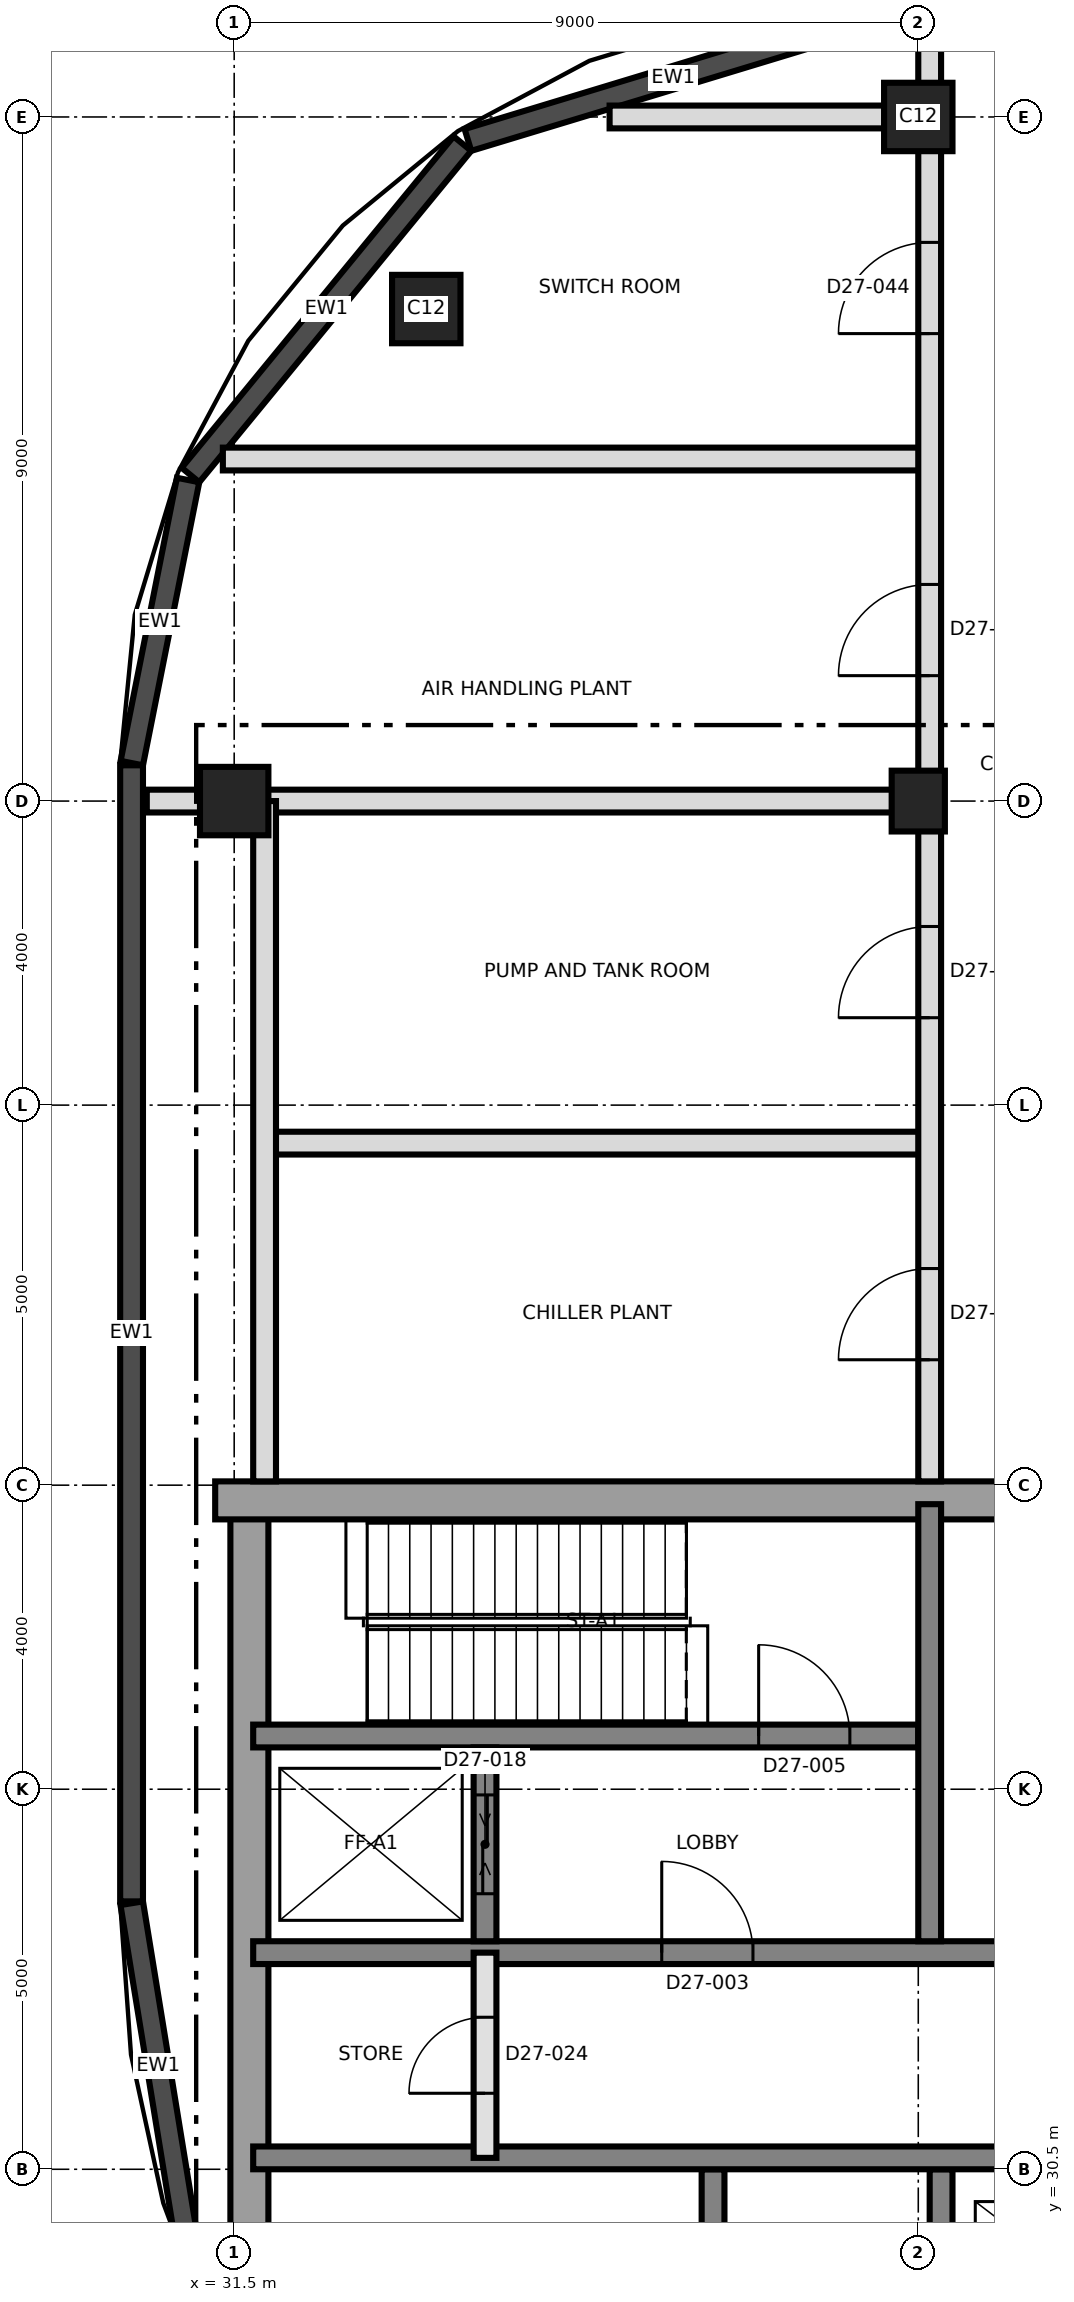
"""IFC4 building model, lengths in metres.
Left out: names, types, materials, properties, quantities, classifications, styles, units other than length and angle.
Written with IfcOpenShell. Run it as: python <this file> out.ifc"""

import sys

from ifc_helpers import new_model, si_unit, direction, frame, frame_2d, origin, origin_2d, place, context, subcontext, project, spatial, rectangle, extrude, element, fill, save


model = new_model("IFC4")
c1 = context("Model", 3, precision=1e-05, world=origin(), true_north=direction((0.0, 1.0)))
c2 = subcontext(c1, "Body", "Model", "MODEL_VIEW")
j1 = project(units=[si_unit("LENGTHUNIT", "METRE"), si_unit("PLANEANGLEUNIT", "RADIAN")], contexts=[c1])
p1 = place(None, origin())
s1 = spatial("IfcSite", under=j1, at=p1, CompositionType="ELEMENT")
p2 = place(p1, origin())
s2 = spatial("IfcBuilding", under=s1, at=p2, CompositionType="ELEMENT")
p3 = place(p2, frame((0.0, 0.0, 243.9)))
s3 = spatial("IfcBuildingStorey", under=s2, at=p3, CompositionType="ELEMENT", Elevation=243.9)
p4 = place(p3, frame((31.7, 21.75, 0.0), z_axis=(0.0, 0.0, 1.0), x_axis=(0.0, 1.0, 0.0)))
e1 = element("IfcWall", 1, at=p4, inside=s3, PredefinedType="SHEAR", context=c2, shape_type="SweptSolid", body=[
    extrude(rectangle(XDim=17.5, YDim=0.5, at=frame_2d((8.75, 0.0))), origin(), (0.0, 0.0, 1.0), 5.5),
])
p5 = place(p3, frame((31.25, 39.3, 0.0), z_axis=(0.0, 0.0, 1.0), x_axis=(1.0, 0.0, 0.0)))
e2 = element("IfcWall", 2, at=p5, inside=s3, PredefinedType="SHEAR", context=c2, shape_type="SweptSolid", body=[
    extrude(rectangle(XDim=27.0, YDim=0.5, at=frame_2d((13.5, 0.0))), origin(), (0.0, 0.0, 1.0), 5.5),
])
p6 = place(p5, frame((10.45, 0.0, 0.0)))
e3 = element("IfcOpeningElement", 3, at=p6, cuts=e2, PredefinedType="OPENING", context=c2, shape_type="SweptSolid", body=[
    extrude(rectangle(XDim=1.2, YDim=2.1, at=frame_2d((0.6, 1.05))), frame((0.0, 0.26, 0.0), z_axis=(0.0, -1.0, 0.0), x_axis=(1.0, 0.0, 0.0)), (0.0, 0.0, 1.0), 0.52),
])
p7 = place(p3, frame((37.8, 21.75, 0.0), z_axis=(0.0, 0.0, 1.0), x_axis=(0.0, 1.0, 0.0)))
e4 = element("IfcWall", 4, at=p7, inside=s3, PredefinedType="SHEAR", context=c2, shape_type="SweptSolid", body=[
    extrude(rectangle(XDim=8.75, YDim=0.3, at=frame_2d((4.375, 0.0))), origin(), (0.0, 0.0, 1.0), 5.5),
])
p8 = place(p7, frame((5.525, 0.0, 0.0)))
e5 = element("IfcOpeningElement", 5, at=p8, cuts=e4, PredefinedType="OPENING", context=c2, shape_type="SweptSolid", body=[
    extrude(rectangle(XDim=1.0, YDim=2.1, at=frame_2d((0.5, 1.05))), frame((0.0, 0.16, 0.0), z_axis=(0.0, -1.0, 0.0), x_axis=(1.0, 0.0, 0.0)), (0.0, 0.0, 1.0), 0.32),
])
p9 = place(p3, frame((40.8, 21.75, 0.0), z_axis=(0.0, 0.0, 1.0), x_axis=(0.0, 1.0, 0.0)))
e6 = element("IfcWall", 6, at=p9, inside=s3, PredefinedType="SHEAR", context=c2, shape_type="SweptSolid", body=[
    extrude(rectangle(XDim=8.75, YDim=0.3, at=frame_2d((4.375, 0.0))), origin(), (0.0, 0.0, 1.0), 5.5),
])
p10 = place(p9, frame((3.9, 0.0, 0.0)))
e7 = element("IfcOpeningElement", 7, at=p10, cuts=e6, PredefinedType="OPENING", context=c2, shape_type="SweptSolid", body=[
    extrude(rectangle(XDim=1.5, YDim=2.1, at=frame_2d((0.75, 1.05))), frame((0.0, 0.16, 0.0), z_axis=(0.0, -1.0, 0.0), x_axis=(1.0, 0.0, 0.0)), (0.0, 0.0, 1.0), 0.32),
])
p11 = place(p3, frame((31.75, 30.65, 0.0), z_axis=(0.0, 0.0, 1.0), x_axis=(1.0, 0.0, 0.0)))
e8 = element("IfcWall", 8, at=p11, inside=s3, PredefinedType="SHEAR", context=c2, shape_type="SweptSolid", body=[
    extrude(rectangle(XDim=26.5, YDim=0.3, at=frame_2d((13.25, 0.0))), origin(), (0.0, 0.0, 1.0), 5.5),
])
p12 = place(p11, frame((24.75, 0.0, 0.0)))
e9 = element("IfcOpeningElement", 9, at=p12, cuts=e8, PredefinedType="OPENING", context=c2, shape_type="SweptSolid", body=[
    extrude(rectangle(XDim=1.0, YDim=2.1, at=frame_2d((0.5, 1.05))), frame((0.0, 0.16, 0.0), z_axis=(0.0, -1.0, 0.0), x_axis=(1.0, 0.0, 0.0)), (0.0, 0.0, 1.0), 0.32),
])
p13 = place(p3, frame((31.75, 33.35, 0.0), z_axis=(0.0, 0.0, 1.0), x_axis=(1.0, 0.0, 0.0)))
e10 = element("IfcWall", 10, at=p13, inside=s3, PredefinedType="SHEAR", context=c2, shape_type="SweptSolid", body=[
    extrude(rectangle(XDim=26.5, YDim=0.3, at=frame_2d((13.25, 0.0))), origin(), (0.0, 0.0, 1.0), 5.5),
])
p14 = place(p13, frame((13.9, 0.0, 0.0)))
e11 = element("IfcOpeningElement", 11, at=p14, cuts=e10, PredefinedType="OPENING", context=c2, shape_type="SweptSolid", body=[
    extrude(rectangle(XDim=1.4, YDim=2.1, at=frame_2d((0.7, 1.05))), frame((0.0, 0.16, 0.0), z_axis=(0.0, -1.0, 0.0), x_axis=(1.0, 0.0, 0.0)), (0.0, 0.0, 1.0), 0.32),
])
p15 = place(p13, frame((5.375, 0.0, 0.0)))
e12 = element("IfcOpeningElement", 12, at=p15, cuts=e10, PredefinedType="OPENING", context=c2, shape_type="SweptSolid", body=[
    extrude(rectangle(XDim=1.2, YDim=2.1, at=frame_2d((0.6, 1.05))), frame((0.0, 0.16, 0.0), z_axis=(0.0, -1.0, 0.0), x_axis=(1.0, 0.0, 0.0)), (0.0, 0.0, 1.0), 0.32),
])
p16 = place(p13, frame((19.925, 0.0, 0.0)))
e13 = element("IfcOpeningElement", 13, at=p16, cuts=e10, PredefinedType="OPENING", context=c2, shape_type="SweptSolid", body=[
    extrude(rectangle(XDim=1.2, YDim=2.1, at=frame_2d((0.6, 1.05))), frame((0.0, 0.16, 0.0), z_axis=(0.0, -1.0, 0.0), x_axis=(1.0, 0.0, 0.0)), (0.0, 0.0, 1.0), 0.32),
])
p17 = place(p3, frame((31.75, 36.2, 0.0), z_axis=(0.0, 0.0, 1.0), x_axis=(1.0, 0.0, 0.0)))
e14 = element("IfcWall", 14, at=p17, inside=s3, PredefinedType="SHEAR", context=c2, shape_type="SweptSolid", body=[
    extrude(rectangle(XDim=8.75, YDim=0.3, at=frame_2d((4.375, 0.0))), origin(), (0.0, 0.0, 1.0), 5.5),
])
p18 = place(p17, frame((6.65, 0.0, 0.0)))
e15 = element("IfcOpeningElement", 15, at=p18, cuts=e14, PredefinedType="OPENING", context=c2, shape_type="SweptSolid", body=[
    extrude(rectangle(XDim=1.2, YDim=2.1, at=frame_2d((0.6, 1.05))), frame((0.0, 0.16, 0.0), z_axis=(0.0, -1.0, 0.0), x_axis=(1.0, 0.0, 0.0)), (0.0, 0.0, 1.0), 0.32),
])
p19 = place(p3, frame((40.65, 33.5, 0.0), z_axis=(0.0, 0.0, 1.0), x_axis=(0.0, 1.0, 0.0)))
e16 = element("IfcWall", 16, at=p19, inside=s3, PredefinedType="SHEAR", context=c2, shape_type="SweptSolid", body=[
    extrude(rectangle(XDim=5.75, YDim=0.3, at=frame_2d((2.875, 0.0))), origin(), (0.0, 0.0, 1.0), 5.5),
])
p20 = place(p3, frame((34.8, 33.5, 0.0), z_axis=(0.0, 0.0, 1.0), x_axis=(0.0, 1.0, 0.0)))
e17 = element("IfcWall", 17, at=p20, inside=s3, PredefinedType="SHEAR", context=c2, shape_type="SweptSolid", body=[
    extrude(rectangle(XDim=2.55, YDim=0.3, at=frame_2d((1.275, 0.0))), origin(), (0.0, 0.0, 1.0), 5.5),
])
p21 = place(p20, frame((0.625, 0.0, 0.0)))
e18 = element("IfcOpeningElement", 18, at=p21, cuts=e17, PredefinedType="OPENING", context=c2, shape_type="SweptSolid", body=[
    extrude(rectangle(XDim=1.3, YDim=2.4, at=frame_2d((0.65, 1.2))), frame((0.0, 0.16, 0.0), z_axis=(0.0, -1.0, 0.0), x_axis=(1.0, 0.0, 0.0)), (0.0, 0.0, 1.0), 0.32),
])
p22 = place(p3, frame((31.5, 48.5, 0.0), z_axis=(0.0, 0.0, 1.0), x_axis=(1.0, 0.0, 0.0)))
e19 = element("IfcColumn", 19, at=p22, inside=s3, PredefinedType="COLUMN", context=c2, shape_type="SweptSolid", body=[
    extrude(rectangle(XDim=0.9, YDim=0.9, at=origin_2d()), origin(), (0.0, 0.0, 1.0), 5.5),
])
p23 = place(p3, frame((40.5, 48.5, 0.0), z_axis=(0.0, 0.0, 1.0), x_axis=(0.0, 1.0, 0.0)))
e20 = element("IfcColumn", 20, at=p23, inside=s3, PredefinedType="COLUMN", context=c2, shape_type="SweptSolid", body=[
    extrude(rectangle(XDim=0.8, YDim=0.7, at=origin_2d()), origin(), (0.0, 0.0, 1.0), 5.5),
])
for number, where, z_axis, x_axis in (
    (21, (34.027, 54.973, 0.0), (0.0, 0.0, 1.0), (1.0, 0.0, 0.0)),
    (22, (40.5, 57.5, 0.0), (0.0, 0.0, 1.0), (1.0, 0.0, 0.0)),
):
    element("IfcColumn", number, at=place(p3, frame(where, z_axis=z_axis, x_axis=x_axis)), inside=s3, PredefinedType="COLUMN", context=c2, shape_type="SweptSolid", body=[
        extrude(rectangle(XDim=0.9, YDim=0.9, at=origin_2d()), origin(), (0.0, 0.0, 1.0), 5.5),
    ])
p24 = place(p3, frame((44.723, 58.103, 0.0), z_axis=(0.0, 0.0, 1.0), x_axis=(-0.98779137081, 0.155782565629, 0.0)))
e23 = element("IfcWall", 23, at=p24, inside=s3, PredefinedType="SOLIDWALL", context=c2, shape_type="SweptSolid", body=[
    extrude(rectangle(XDim=4.736, YDim=0.3, at=frame_2d((2.368, 0.0))), origin(), (0.0, 0.0, 1.0), 5.2),
])
p25 = place(p3, frame((39.978, 58.836, 0.0), z_axis=(0.0, 0.0, 1.0), x_axis=(-0.956941081769, -0.29028221789, 0.0)))
e24 = element("IfcWall", 24, at=p25, inside=s3, PredefinedType="SOLIDWALL", context=c2, shape_type="SweptSolid", body=[
    extrude(rectangle(XDim=5.646, YDim=0.3, at=frame_2d((2.823, 0.0))), origin(), (0.0, 0.0, 1.0), 5.2),
])
p26 = place(p3, frame((34.502, 57.149, 0.0), z_axis=(0.0, 0.0, 1.0), x_axis=(-0.63439223677, -0.773011312936, 0.0)))
e25 = element("IfcWall", 25, at=p26, inside=s3, PredefinedType="SOLIDWALL", context=c2, shape_type="SweptSolid", body=[
    extrude(rectangle(XDim=5.639, YDim=0.3, at=frame_2d((2.82, 0.0))), origin(), (0.0, 0.0, 1.0), 5.2),
])
p27 = place(p3, frame((30.894, 52.724, 0.0), z_axis=(0.0, 0.0, 1.0), x_axis=(-0.195077379777, -0.980787854686, 0.0)))
e26 = element("IfcWall", 26, at=p27, inside=s3, PredefinedType="SOLIDWALL", context=c2, shape_type="SweptSolid", body=[
    extrude(rectangle(XDim=3.797, YDim=0.3, at=frame_2d((1.898, 0.0))), origin(), (0.0, 0.0, 1.0), 5.2),
])
p28 = place(p3, frame((30.15, 48.97, 0.0), z_axis=(0.0, 0.0, 1.0), x_axis=(0.0, -1.0, 0.0)))
e27 = element("IfcWall", 27, at=p28, inside=s3, PredefinedType="SOLIDWALL", context=c2, shape_type="SweptSolid", body=[
    extrude(rectangle(XDim=14.946, YDim=0.3, at=frame_2d((7.473, 0.0))), origin(), (0.0, 0.0, 1.0), 5.2),
])
p29 = place(p3, frame((30.152, 34.0, 0.0), z_axis=(0.0, 0.0, 1.0), x_axis=(0.160697303067, -0.987003736967, 0.0)))
e28 = element("IfcWall", 28, at=p29, inside=s3, PredefinedType="SOLIDWALL", context=c2, shape_type="SweptSolid", body=[
    extrude(rectangle(XDim=4.333, YDim=0.3, at=frame_2d((2.167, 0.0))), origin(), (0.0, 0.0, 1.0), 5.2),
])
p30 = place(p3, frame((34.8, 30.65, 0.0), z_axis=(0.0, 0.0, 1.0), x_axis=(0.0, 1.0, 0.0)))
e29 = element("IfcWall", 29, at=p30, inside=s3, PredefinedType="SOLIDWALL", context=c2, shape_type="SweptSolid", body=[
    extrude(rectangle(XDim=2.7, YDim=0.3, at=frame_2d((1.35, 0.0))), origin(), (0.0, 0.0, 1.0), 5.2),
])
p31 = place(p30, frame((0.85, 0.0, 0.0)))
e30 = element("IfcOpeningElement", 30, at=p31, cuts=e29, PredefinedType="OPENING", context=c2, shape_type="SweptSolid", body=[
    extrude(rectangle(XDim=1.0, YDim=2.1, at=frame_2d((0.5, 1.05))), frame((0.0, 0.16, 0.0), z_axis=(0.0, -1.0, 0.0), x_axis=(1.0, 0.0, 0.0)), (0.0, 0.0, 1.0), 0.32),
])
p32 = place(p3, frame((31.9, 44.0, 0.0), z_axis=(0.0, 0.0, 1.0), x_axis=(1.0, 0.0, 0.0)))
e31 = element("IfcWall", 31, at=p32, inside=s3, PredefinedType="PARTITIONING", context=c2, shape_type="SweptSolid", body=[
    extrude(rectangle(XDim=8.75, YDim=0.3, at=frame_2d((4.375, 0.0))), origin(), (0.0, 0.0, 1.0), 5.2),
])
p33 = place(p3, frame((30.35, 48.5, 0.0), z_axis=(0.0, 0.0, 1.0), x_axis=(1.0, 0.0, 0.0)))
e32 = element("IfcWall", 32, at=p33, inside=s3, PredefinedType="PARTITIONING", context=c2, shape_type="SweptSolid", body=[
    extrude(rectangle(XDim=10.3, YDim=0.3, at=frame_2d((5.15, 0.0))), origin(), (0.0, 0.0, 1.0), 5.2),
])
p34 = place(p3, frame((31.351, 53.0, 0.0), z_axis=(0.0, 0.0, 1.0), x_axis=(1.0, 0.0, 0.0)))
e33 = element("IfcWall", 33, at=p34, inside=s3, PredefinedType="PARTITIONING", context=c2, shape_type="SweptSolid", body=[
    extrude(rectangle(XDim=9.299, YDim=0.3, at=frame_2d((4.649, 0.0))), origin(), (0.0, 0.0, 1.0), 5.2),
])
p35 = place(p3, frame((36.439, 57.5, 0.0), z_axis=(0.0, 0.0, 1.0), x_axis=(1.0, 0.0, 0.0)))
e34 = element("IfcWall", 34, at=p35, inside=s3, PredefinedType="PARTITIONING", context=c2, shape_type="SweptSolid", body=[
    extrude(rectangle(XDim=4.211, YDim=0.3, at=frame_2d((2.105, 0.0))), origin(), (0.0, 0.0, 1.0), 5.2),
])
p36 = place(p3, frame((31.9, 39.55, 0.0), z_axis=(0.0, 0.0, 1.0), x_axis=(0.0, 1.0, 0.0)))
e35 = element("IfcWall", 35, at=p36, inside=s3, PredefinedType="PARTITIONING", context=c2, shape_type="SweptSolid", body=[
    extrude(rectangle(XDim=8.95, YDim=0.3, at=frame_2d((4.475, 0.0))), origin(), (0.0, 0.0, 1.0), 5.2),
])
p37 = place(p3, frame((40.65, 39.55, 0.0), z_axis=(0.0, 0.0, 1.0), x_axis=(0.0, 1.0, 0.0)))
e36 = element("IfcWall", 36, at=p37, inside=s3, PredefinedType="PARTITIONING", context=c2, shape_type="SweptSolid", body=[
    extrude(rectangle(XDim=19.0, YDim=0.3, at=frame_2d((9.5, 0.0))), origin(), (0.0, 0.0, 1.0), 5.2),
])
p38 = place(p37, frame((1.6, 0.0, 0.0)))
e37 = element("IfcOpeningElement", 37, at=p38, cuts=e36, PredefinedType="OPENING", context=c2, shape_type="SweptSolid", body=[
    extrude(rectangle(XDim=1.2, YDim=2.1, at=frame_2d((0.6, 1.05))), frame((0.0, 0.16, 0.0), z_axis=(0.0, -1.0, 0.0), x_axis=(1.0, 0.0, 0.0)), (0.0, 0.0, 1.0), 0.32),
])
p39 = place(p37, frame((6.1, 0.0, 0.0)))
e38 = element("IfcOpeningElement", 38, at=p39, cuts=e36, PredefinedType="OPENING", context=c2, shape_type="SweptSolid", body=[
    extrude(rectangle(XDim=1.2, YDim=2.1, at=frame_2d((0.6, 1.05))), frame((0.0, 0.16, 0.0), z_axis=(0.0, -1.0, 0.0), x_axis=(1.0, 0.0, 0.0)), (0.0, 0.0, 1.0), 0.32),
])
p40 = place(p37, frame((10.6, 0.0, 0.0)))
e39 = element("IfcOpeningElement", 39, at=p40, cuts=e36, PredefinedType="OPENING", context=c2, shape_type="SweptSolid", body=[
    extrude(rectangle(XDim=1.2, YDim=2.1, at=frame_2d((0.6, 1.05))), frame((0.0, 0.16, 0.0), z_axis=(0.0, -1.0, 0.0), x_axis=(1.0, 0.0, 0.0)), (0.0, 0.0, 1.0), 0.32),
])
p41 = place(p37, frame((15.1, 0.0, 0.0)))
e40 = element("IfcOpeningElement", 40, at=p41, cuts=e36, PredefinedType="OPENING", context=c2, shape_type="SweptSolid", body=[
    extrude(rectangle(XDim=1.2, YDim=2.1, at=frame_2d((0.6, 1.05))), frame((0.0, 0.16, 0.0), z_axis=(0.0, -1.0, 0.0), x_axis=(1.0, 0.0, 0.0)), (0.0, 0.0, 1.0), 0.32),
])
p42 = place(p15, origin())
e41 = element("IfcDoor", 41, at=p42, inside=s3, OperationType="SINGLE_SWING_LEFT", PredefinedType="DOOR", context=c2, shape_type="SweptSolid", body=[
    extrude(rectangle(XDim=1.2, YDim=2.1, at=frame_2d((0.6, 1.05))), frame((0.0, 0.025, 0.0), z_axis=(0.0, -1.0, 0.0), x_axis=(1.0, 0.0, 0.0)), (0.0, 0.0, 1.0), 0.05),
])
fill(e12, e41)
p43 = place(p18, origin())
e42 = element("IfcDoor", 42, at=p43, inside=s3, OperationType="SINGLE_SWING_RIGHT", PredefinedType="DOOR", context=c2, shape_type="SweptSolid", body=[
    extrude(rectangle(XDim=1.2, YDim=2.1, at=frame_2d((0.6, 1.05))), frame((0.0, 0.025, 0.0), z_axis=(0.0, -1.0, 0.0), x_axis=(1.0, 0.0, 0.0)), (0.0, 0.0, 1.0), 0.05),
])
fill(e15, e42)
p44 = place(p21, origin())
e43 = element("IfcDoor", 43, at=p44, inside=s3, OperationType="SLIDING_TO_LEFT", PredefinedType="DOOR", context=c2, shape_type="SweptSolid", body=[
    extrude(rectangle(XDim=1.3, YDim=2.4, at=frame_2d((0.65, 1.2))), frame((0.0, 0.025, 0.0), z_axis=(0.0, -1.0, 0.0), x_axis=(1.0, 0.0, 0.0)), (0.0, 0.0, 1.0), 0.05),
])
fill(e18, e43)
p45 = place(p31, origin())
e44 = element("IfcDoor", 44, at=p45, inside=s3, OperationType="SINGLE_SWING_LEFT", PredefinedType="DOOR", context=c2, shape_type="SweptSolid", body=[
    extrude(rectangle(XDim=1.0, YDim=2.1, at=frame_2d((0.5, 1.05))), frame((0.0, 0.025, 0.0), z_axis=(0.0, -1.0, 0.0), x_axis=(1.0, 0.0, 0.0)), (0.0, 0.0, 1.0), 0.05),
])
fill(e30, e44)
p46 = place(p38, origin())
e45 = element("IfcDoor", 45, at=p46, inside=s3, OperationType="SINGLE_SWING_RIGHT", PredefinedType="DOOR", context=c2, shape_type="SweptSolid", body=[
    extrude(rectangle(XDim=1.2, YDim=2.1, at=frame_2d((0.6, 1.05))), frame((0.0, 0.025, 0.0), z_axis=(0.0, -1.0, 0.0), x_axis=(1.0, 0.0, 0.0)), (0.0, 0.0, 1.0), 0.05),
])
fill(e37, e45)
p47 = place(p39, origin())
e46 = element("IfcDoor", 46, at=p47, inside=s3, OperationType="SINGLE_SWING_LEFT", PredefinedType="DOOR", context=c2, shape_type="SweptSolid", body=[
    extrude(rectangle(XDim=1.2, YDim=2.1, at=frame_2d((0.6, 1.05))), frame((0.0, 0.025, 0.0), z_axis=(0.0, -1.0, 0.0), x_axis=(1.0, 0.0, 0.0)), (0.0, 0.0, 1.0), 0.05),
])
fill(e38, e46)
p48 = place(p40, origin())
e47 = element("IfcDoor", 47, at=p48, inside=s3, OperationType="SINGLE_SWING_LEFT", PredefinedType="DOOR", context=c2, shape_type="SweptSolid", body=[
    extrude(rectangle(XDim=1.2, YDim=2.1, at=frame_2d((0.6, 1.05))), frame((0.0, 0.025, 0.0), z_axis=(0.0, -1.0, 0.0), x_axis=(1.0, 0.0, 0.0)), (0.0, 0.0, 1.0), 0.05),
])
fill(e39, e47)
p49 = place(p41, origin())
e48 = element("IfcDoor", 48, at=p49, inside=s3, OperationType="SINGLE_SWING_LEFT", PredefinedType="DOOR", context=c2, shape_type="SweptSolid", body=[
    extrude(rectangle(XDim=1.2, YDim=2.1, at=frame_2d((0.6, 1.05))), frame((0.0, 0.025, 0.0), z_axis=(0.0, -1.0, 0.0), x_axis=(1.0, 0.0, 0.0)), (0.0, 0.0, 1.0), 0.05),
])
fill(e40, e48)
save(model, sys.argv[1])
